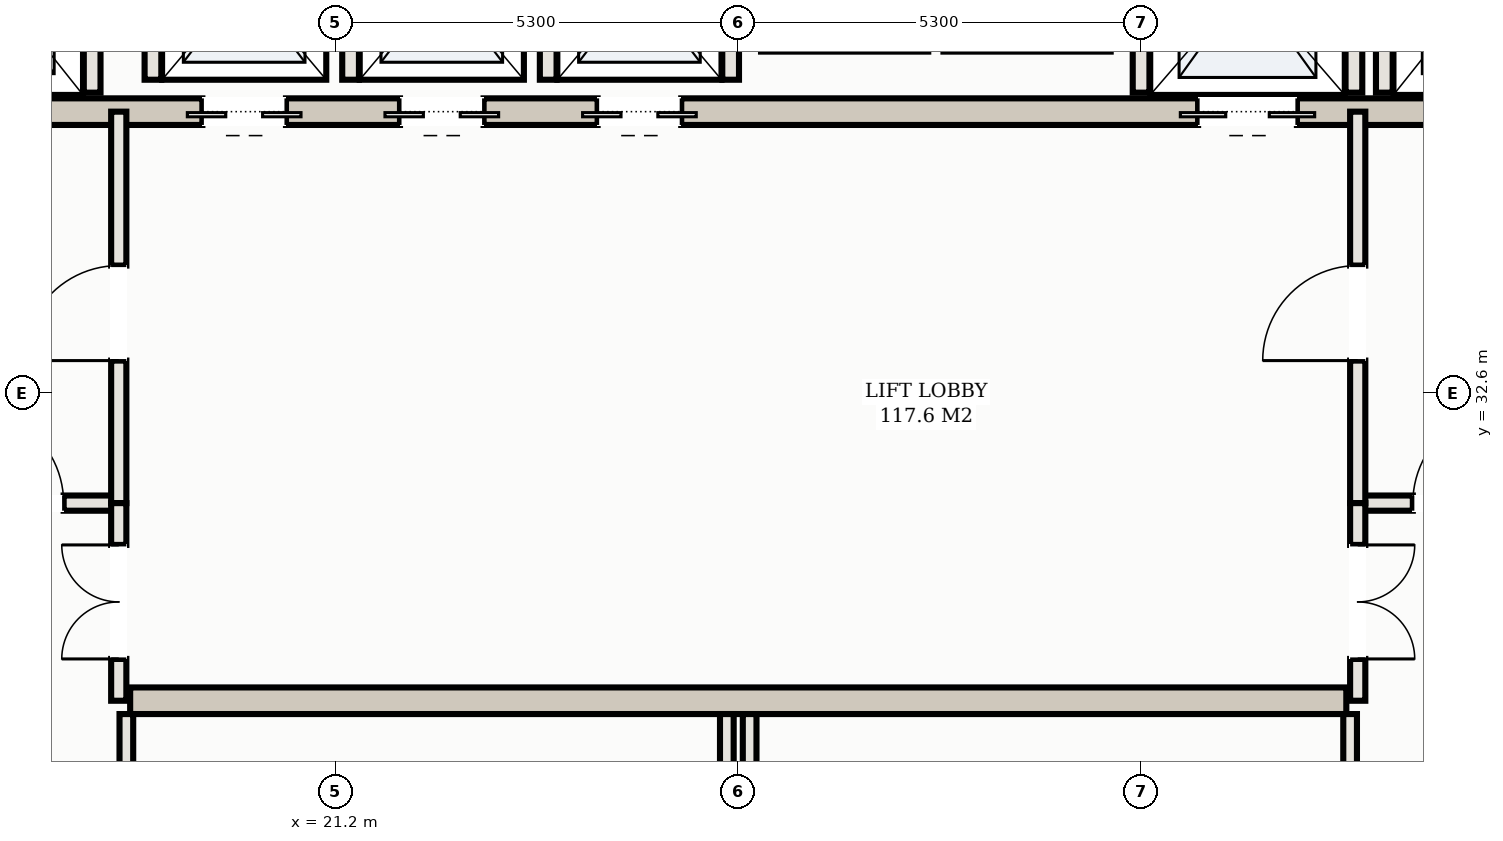
"""IFC4 building model, lengths in metres.
Left out: names, types, materials, properties, quantities, classifications, styles, units other than length and angle.
Written with IfcOpenShell. Run it as: python <this file> out.ifc"""

import sys

from ifc_helpers import new_model, si_unit, direction, frame, frame_2d, origin, place, context, subcontext, project, spatial, rectangle, extrude, element, fill, save


model = new_model("IFC4")
c1 = context("Model", 3, precision=1e-05, world=origin(), true_north=direction((0.0, 1.0)))
c2 = subcontext(c1, "Body", "Model", "MODEL_VIEW")
j1 = project(units=[si_unit("LENGTHUNIT", "METRE"), si_unit("PLANEANGLEUNIT", "RADIAN")], contexts=[c1])
p1 = place(None, origin())
s1 = spatial("IfcSite", under=j1, at=p1, CompositionType="ELEMENT")
p2 = place(p1, origin())
s2 = spatial("IfcBuilding", under=s1, at=p2, CompositionType="ELEMENT")
p3 = place(p2, frame((0.0, 0.0, 266.0)))
s3 = spatial("IfcBuildingStorey", under=s2, at=p3, CompositionType="ELEMENT", Elevation=266.0)
p4 = place(p3, frame((15.5, 36.3, 0.0), z_axis=(0.0, 0.0, 1.0), x_axis=(1.0, 0.0, 0.0)))
e1 = element("IfcWall", 1, at=p4, inside=s3, PredefinedType="SHEAR", context=c2, shape_type="SweptSolid", body=[
    extrude(rectangle(XDim=22.0, YDim=0.35, at=frame_2d((11.0, 0.0))), origin(), (0.0, 0.0, 1.0), 4.52),
])
p5 = place(p4, frame((0.65, 0.0, 0.0)))
e2 = element("IfcOpeningElement", 2, at=p5, cuts=e1, PredefinedType="OPENING", context=c2, shape_type="SweptSolid", body=[
    extrude(rectangle(XDim=1.1, YDim=2.15, at=frame_2d((0.55, 1.075))), frame((0.0, 0.185, 0.0), z_axis=(0.0, -1.0, 0.0), x_axis=(1.0, 0.0, 0.0)), (0.0, 0.0, 1.0), 0.37),
])
p6 = place(p4, frame((20.25, 0.0, 0.0)))
e3 = element("IfcOpeningElement", 3, at=p6, cuts=e1, PredefinedType="OPENING", context=c2, shape_type="SweptSolid", body=[
    extrude(rectangle(XDim=1.1, YDim=2.15, at=frame_2d((0.55, 1.075))), frame((0.0, 0.185, 0.0), z_axis=(0.0, -1.0, 0.0), x_axis=(1.0, 0.0, 0.0)), (0.0, 0.0, 1.0), 0.37),
])
p7 = place(p4, frame((17.05, 0.0, 0.0)))
e4 = element("IfcOpeningElement", 4, at=p7, cuts=e1, PredefinedType="OPENING", context=c2, shape_type="SweptSolid", body=[
    extrude(rectangle(XDim=1.3, YDim=2.2, at=frame_2d((0.65, 1.1))), frame((0.0, 0.185, 0.0), z_axis=(0.0, -1.0, 0.0), x_axis=(1.0, 0.0, 0.0)), (0.0, 0.0, 1.0), 0.37),
])
p8 = place(p4, frame((3.95, 0.0, 0.0)))
e5 = element("IfcOpeningElement", 5, at=p8, cuts=e1, PredefinedType="OPENING", context=c2, shape_type="SweptSolid", body=[
    extrude(rectangle(XDim=1.1, YDim=2.15, at=frame_2d((0.55, 1.075))), frame((0.0, 0.185, 0.0), z_axis=(0.0, -1.0, 0.0), x_axis=(1.0, 0.0, 0.0)), (0.0, 0.0, 1.0), 0.37),
])
p9 = place(p4, frame((6.55, 0.0, 0.0)))
e6 = element("IfcOpeningElement", 6, at=p9, cuts=e1, PredefinedType="OPENING", context=c2, shape_type="SweptSolid", body=[
    extrude(rectangle(XDim=1.1, YDim=2.15, at=frame_2d((0.55, 1.075))), frame((0.0, 0.185, 0.0), z_axis=(0.0, -1.0, 0.0), x_axis=(1.0, 0.0, 0.0)), (0.0, 0.0, 1.0), 0.37),
])
p10 = place(p4, frame((9.15, 0.0, 0.0)))
e7 = element("IfcOpeningElement", 7, at=p10, cuts=e1, PredefinedType="OPENING", context=c2, shape_type="SweptSolid", body=[
    extrude(rectangle(XDim=1.1, YDim=2.15, at=frame_2d((0.55, 1.075))), frame((0.0, 0.185, 0.0), z_axis=(0.0, -1.0, 0.0), x_axis=(1.0, 0.0, 0.0)), (0.0, 0.0, 1.0), 0.37),
])
p11 = place(p3, frame((18.5, 28.55, 0.0), z_axis=(0.0, 0.0, 1.0), x_axis=(1.0, 0.0, 0.0)))
e8 = element("IfcWall", 8, at=p11, inside=s3, PredefinedType="SHEAR", context=c2, shape_type="SweptSolid", body=[
    extrude(rectangle(XDim=16.0, YDim=0.35, at=frame_2d((8.0, 0.0))), origin(), (0.0, 0.0, 1.0), 4.52),
])
for number, where, z_axis, x_axis in (
    (9, (18.0, 36.55, 0.0), (0.0, 0.0, 1.0), (0.0, 1.0, 0.0)),
    (10, (35.0, 36.55, 0.0), (0.0, 0.0, 1.0), (0.0, 1.0, 0.0)),
    (11, (31.8, 36.55, 0.0), (0.0, 0.0, 1.0), (0.0, 1.0, 0.0)),
    (12, (34.6, 36.55, 0.0), (0.0, 0.0, 1.0), (0.0, 1.0, 0.0)),
):
    element("IfcWall", number, at=place(p3, frame(where, z_axis=z_axis, x_axis=x_axis)), inside=s3, PredefinedType="SOLIDWALL", context=c2, shape_type="SweptSolid", body=[
        extrude(rectangle(XDim=2.93, YDim=0.22, at=frame_2d((1.465, 0.0))), origin(), (0.0, 0.0, 1.0), 4.52),
    ])
for number, where, z_axis, x_axis in (
    (13, (18.8, 36.72, 0.0), (0.0, 0.0, 1.0), (0.0, 1.0, 0.0)),
    (14, (21.4, 36.72, 0.0), (0.0, 0.0, 1.0), (0.0, 1.0, 0.0)),
    (15, (24.0, 36.72, 0.0), (0.0, 0.0, 1.0), (0.0, 1.0, 0.0)),
    (16, (26.4, 36.72, 0.0), (0.0, 0.0, 1.0), (0.0, 1.0, 0.0)),
):
    element("IfcWall", number, at=place(p3, frame(where, z_axis=z_axis, x_axis=x_axis)), inside=s3, PredefinedType="SOLIDWALL", context=c2, shape_type="SweptSolid", body=[
        extrude(rectangle(XDim=2.56, YDim=0.22, at=frame_2d((1.28, 0.0))), origin(), (0.0, 0.0, 1.0), 4.52),
    ])
p12 = place(p3, frame((15.1, 31.15, 0.0), z_axis=(0.0, 0.0, 1.0), x_axis=(1.0, 0.0, 0.0)))
e17 = element("IfcWall", 17, at=p12, inside=s3, PredefinedType="PARTITIONING", context=c2, shape_type="SweptSolid", body=[
    extrude(rectangle(XDim=3.25, YDim=0.2, at=frame_2d((1.625, 0.0))), origin(), (0.0, 0.0, 1.0), 4.52),
])
p13 = place(p12, frame((1.275, 0.0, 0.0)))
e18 = element("IfcOpeningElement", 18, at=p13, cuts=e17, PredefinedType="OPENING", context=c2, shape_type="SweptSolid", body=[
    extrude(rectangle(XDim=1.25, YDim=2.2, at=frame_2d((0.625, 1.1))), frame((0.0, 0.11, 0.0), z_axis=(0.0, -1.0, 0.0), x_axis=(1.0, 0.0, 0.0)), (0.0, 0.0, 1.0), 0.22),
])
p14 = place(p3, frame((18.35, 31.15, 0.0), z_axis=(0.0, 0.0, 1.0), x_axis=(0.0, 1.0, 0.0)))
e19 = element("IfcWall", 19, at=p14, inside=s3, PredefinedType="PARTITIONING", context=c2, shape_type="SweptSolid", body=[
    extrude(rectangle(XDim=5.15, YDim=0.2, at=frame_2d((2.575, 0.0))), origin(), (0.0, 0.0, 1.0), 4.52),
])
p15 = place(p14, frame((1.875, 0.0, 0.0)))
e20 = element("IfcOpeningElement", 20, at=p15, cuts=e19, PredefinedType="OPENING", context=c2, shape_type="SweptSolid", body=[
    extrude(rectangle(XDim=1.25, YDim=2.2, at=frame_2d((0.625, 1.1))), frame((0.0, 0.11, 0.0), z_axis=(0.0, -1.0, 0.0), x_axis=(1.0, 0.0, 0.0)), (0.0, 0.0, 1.0), 0.22),
])
p16 = place(p3, frame((34.65, 31.15, 0.0), z_axis=(0.0, 0.0, 1.0), x_axis=(1.0, 0.0, 0.0)))
e21 = element("IfcWall", 21, at=p16, inside=s3, PredefinedType="PARTITIONING", context=c2, shape_type="SweptSolid", body=[
    extrude(rectangle(XDim=3.25, YDim=0.2, at=frame_2d((1.625, 0.0))), origin(), (0.0, 0.0, 1.0), 4.52),
])
p17 = place(p16, frame((0.725, 0.0, 0.0)))
e22 = element("IfcOpeningElement", 22, at=p17, cuts=e21, PredefinedType="OPENING", context=c2, shape_type="SweptSolid", body=[
    extrude(rectangle(XDim=1.25, YDim=2.2, at=frame_2d((0.625, 1.1))), frame((0.0, 0.11, 0.0), z_axis=(0.0, -1.0, 0.0), x_axis=(1.0, 0.0, 0.0)), (0.0, 0.0, 1.0), 0.22),
])
p18 = place(p3, frame((34.65, 31.15, 0.0), z_axis=(0.0, 0.0, 1.0), x_axis=(0.0, 1.0, 0.0)))
e23 = element("IfcWall", 23, at=p18, inside=s3, PredefinedType="PARTITIONING", context=c2, shape_type="SweptSolid", body=[
    extrude(rectangle(XDim=5.15, YDim=0.2, at=frame_2d((2.575, 0.0))), origin(), (0.0, 0.0, 1.0), 4.52),
])
p19 = place(p18, frame((1.875, 0.0, 0.0)))
e24 = element("IfcOpeningElement", 24, at=p19, cuts=e23, PredefinedType="OPENING", context=c2, shape_type="SweptSolid", body=[
    extrude(rectangle(XDim=1.25, YDim=2.2, at=frame_2d((0.625, 1.1))), frame((0.0, 0.11, 0.0), z_axis=(0.0, -1.0, 0.0), x_axis=(1.0, 0.0, 0.0)), (0.0, 0.0, 1.0), 0.22),
])
p20 = place(p3, frame((18.35, 28.55, 0.0), z_axis=(0.0, 0.0, 1.0), x_axis=(0.0, 1.0, 0.0)))
e25 = element("IfcWall", 25, at=p20, inside=s3, PredefinedType="PARTITIONING", context=c2, shape_type="SweptSolid", body=[
    extrude(rectangle(XDim=2.6, YDim=0.2, at=frame_2d((1.3, 0.0))), origin(), (0.0, 0.0, 1.0), 4.52),
])
p21 = place(p20, frame((0.55, 0.0, 0.0)))
e26 = element("IfcOpeningElement", 26, at=p21, cuts=e25, PredefinedType="OPENING", context=c2, shape_type="SweptSolid", body=[
    extrude(rectangle(XDim=1.5, YDim=2.25, at=frame_2d((0.75, 1.125))), frame((0.0, 0.11, 0.0), z_axis=(0.0, -1.0, 0.0), x_axis=(1.0, 0.0, 0.0)), (0.0, 0.0, 1.0), 0.22),
])
p22 = place(p3, frame((34.65, 28.55, 0.0), z_axis=(0.0, 0.0, 1.0), x_axis=(0.0, 1.0, 0.0)))
e27 = element("IfcWall", 27, at=p22, inside=s3, PredefinedType="PARTITIONING", context=c2, shape_type="SweptSolid", body=[
    extrude(rectangle(XDim=2.6, YDim=0.2, at=frame_2d((1.3, 0.0))), origin(), (0.0, 0.0, 1.0), 4.52),
])
p23 = place(p22, frame((0.55, 0.0, 0.0)))
e28 = element("IfcOpeningElement", 28, at=p23, cuts=e27, PredefinedType="OPENING", context=c2, shape_type="SweptSolid", body=[
    extrude(rectangle(XDim=1.5, YDim=2.25, at=frame_2d((0.75, 1.125))), frame((0.0, 0.11, 0.0), z_axis=(0.0, -1.0, 0.0), x_axis=(1.0, 0.0, 0.0)), (0.0, 0.0, 1.0), 0.22),
])
for number, where, z_axis, x_axis in (
    (29, (18.45, 25.62, 0.0), (0.0, 0.0, 1.0), (0.0, 1.0, 0.0)),
    (30, (26.35, 25.62, 0.0), (0.0, 0.0, 1.0), (0.0, 1.0, 0.0)),
    (31, (26.65, 25.62, 0.0), (0.0, 0.0, 1.0), (0.0, 1.0, 0.0)),
    (32, (34.55, 25.62, 0.0), (0.0, 0.0, 1.0), (0.0, 1.0, 0.0)),
):
    element("IfcWall", number, at=place(p3, frame(where, z_axis=z_axis, x_axis=x_axis)), inside=s3, PredefinedType="PARTITIONING", context=c2, shape_type="SweptSolid", body=[
        extrude(rectangle(XDim=2.755, YDim=0.18, at=frame_2d((1.377, 0.0))), origin(), (0.0, 0.0, 1.0), 4.52),
    ])
p24 = place(p7, frame((1.3, 0.0, 0.0), z_axis=(0.0, 0.0, 1.0), x_axis=(-1.0, 0.0, 0.0)))
e33 = element("IfcDoor", 33, at=p24, inside=s3, OperationType="DOUBLE_DOOR_SLIDING", PredefinedType="DOOR", context=c2, shape_type="SweptSolid", body=[
    extrude(rectangle(XDim=1.3, YDim=2.2, at=frame_2d((0.65, 1.1))), frame((0.0, 0.025, 0.0), z_axis=(0.0, -1.0, 0.0), x_axis=(1.0, 0.0, 0.0)), (0.0, 0.0, 1.0), 0.05),
])
fill(e4, e33)
p25 = place(p8, frame((1.1, 0.0, 0.0), z_axis=(0.0, 0.0, 1.0), x_axis=(-1.0, 0.0, 0.0)))
e34 = element("IfcDoor", 34, at=p25, inside=s3, OperationType="DOUBLE_DOOR_SLIDING", PredefinedType="DOOR", context=c2, shape_type="SweptSolid", body=[
    extrude(rectangle(XDim=1.1, YDim=2.15, at=frame_2d((0.55, 1.075))), frame((0.0, 0.025, 0.0), z_axis=(0.0, -1.0, 0.0), x_axis=(1.0, 0.0, 0.0)), (0.0, 0.0, 1.0), 0.05),
])
fill(e5, e34)
p26 = place(p9, frame((1.1, 0.0, 0.0), z_axis=(0.0, 0.0, 1.0), x_axis=(-1.0, 0.0, 0.0)))
e35 = element("IfcDoor", 35, at=p26, inside=s3, OperationType="DOUBLE_DOOR_SLIDING", PredefinedType="DOOR", context=c2, shape_type="SweptSolid", body=[
    extrude(rectangle(XDim=1.1, YDim=2.15, at=frame_2d((0.55, 1.075))), frame((0.0, 0.025, 0.0), z_axis=(0.0, -1.0, 0.0), x_axis=(1.0, 0.0, 0.0)), (0.0, 0.0, 1.0), 0.05),
])
fill(e6, e35)
p27 = place(p10, frame((1.1, 0.0, 0.0), z_axis=(0.0, 0.0, 1.0), x_axis=(-1.0, 0.0, 0.0)))
e36 = element("IfcDoor", 36, at=p27, inside=s3, OperationType="DOUBLE_DOOR_SLIDING", PredefinedType="DOOR", context=c2, shape_type="SweptSolid", body=[
    extrude(rectangle(XDim=1.1, YDim=2.15, at=frame_2d((0.55, 1.075))), frame((0.0, 0.025, 0.0), z_axis=(0.0, -1.0, 0.0), x_axis=(1.0, 0.0, 0.0)), (0.0, 0.0, 1.0), 0.05),
])
fill(e7, e36)
p28 = place(p13, origin())
e37 = element("IfcDoor", 37, at=p28, inside=s3, OperationType="SINGLE_SWING_LEFT", PredefinedType="DOOR", context=c2, shape_type="SweptSolid", body=[
    extrude(rectangle(XDim=1.25, YDim=2.2, at=frame_2d((0.625, 1.1))), frame((0.0, 0.025, 0.0), z_axis=(0.0, -1.0, 0.0), x_axis=(1.0, 0.0, 0.0)), (0.0, 0.0, 1.0), 0.05),
])
fill(e18, e37)
p29 = place(p15, origin())
e38 = element("IfcDoor", 38, at=p29, inside=s3, OperationType="SINGLE_SWING_LEFT", PredefinedType="DOOR", context=c2, shape_type="SweptSolid", body=[
    extrude(rectangle(XDim=1.25, YDim=2.2, at=frame_2d((0.625, 1.1))), frame((0.0, 0.025, 0.0), z_axis=(0.0, -1.0, 0.0), x_axis=(1.0, 0.0, 0.0)), (0.0, 0.0, 1.0), 0.05),
])
fill(e20, e38)
p30 = place(p17, origin())
e39 = element("IfcDoor", 39, at=p30, inside=s3, OperationType="SINGLE_SWING_RIGHT", PredefinedType="DOOR", context=c2, shape_type="SweptSolid", body=[
    extrude(rectangle(XDim=1.25, YDim=2.2, at=frame_2d((0.625, 1.1))), frame((0.0, 0.025, 0.0), z_axis=(0.0, -1.0, 0.0), x_axis=(1.0, 0.0, 0.0)), (0.0, 0.0, 1.0), 0.05),
])
fill(e22, e39)
p31 = place(p19, origin())
e40 = element("IfcDoor", 40, at=p31, inside=s3, OperationType="SINGLE_SWING_LEFT", PredefinedType="DOOR", context=c2, shape_type="SweptSolid", body=[
    extrude(rectangle(XDim=1.25, YDim=2.2, at=frame_2d((0.625, 1.1))), frame((0.0, 0.025, 0.0), z_axis=(0.0, -1.0, 0.0), x_axis=(1.0, 0.0, 0.0)), (0.0, 0.0, 1.0), 0.05),
])
fill(e24, e40)
p32 = place(p21, origin())
e41 = element("IfcDoor", 41, at=p32, inside=s3, OperationType="DOUBLE_DOOR_SINGLE_SWING", PredefinedType="DOOR", context=c2, shape_type="SweptSolid", body=[
    extrude(rectangle(XDim=1.5, YDim=2.25, at=frame_2d((0.75, 1.125))), frame((0.0, 0.025, 0.0), z_axis=(0.0, -1.0, 0.0), x_axis=(1.0, 0.0, 0.0)), (0.0, 0.0, 1.0), 0.05),
])
fill(e26, e41)
p33 = place(p23, frame((1.5, 0.0, 0.0), z_axis=(0.0, 0.0, 1.0), x_axis=(-1.0, 0.0, 0.0)))
e42 = element("IfcDoor", 42, at=p33, inside=s3, OperationType="DOUBLE_DOOR_SINGLE_SWING", PredefinedType="DOOR", context=c2, shape_type="SweptSolid", body=[
    extrude(rectangle(XDim=1.5, YDim=2.25, at=frame_2d((0.75, 1.125))), frame((0.0, 0.025, 0.0), z_axis=(0.0, -1.0, 0.0), x_axis=(1.0, 0.0, 0.0)), (0.0, 0.0, 1.0), 0.05),
])
fill(e28, e42)
save(model, sys.argv[1])
